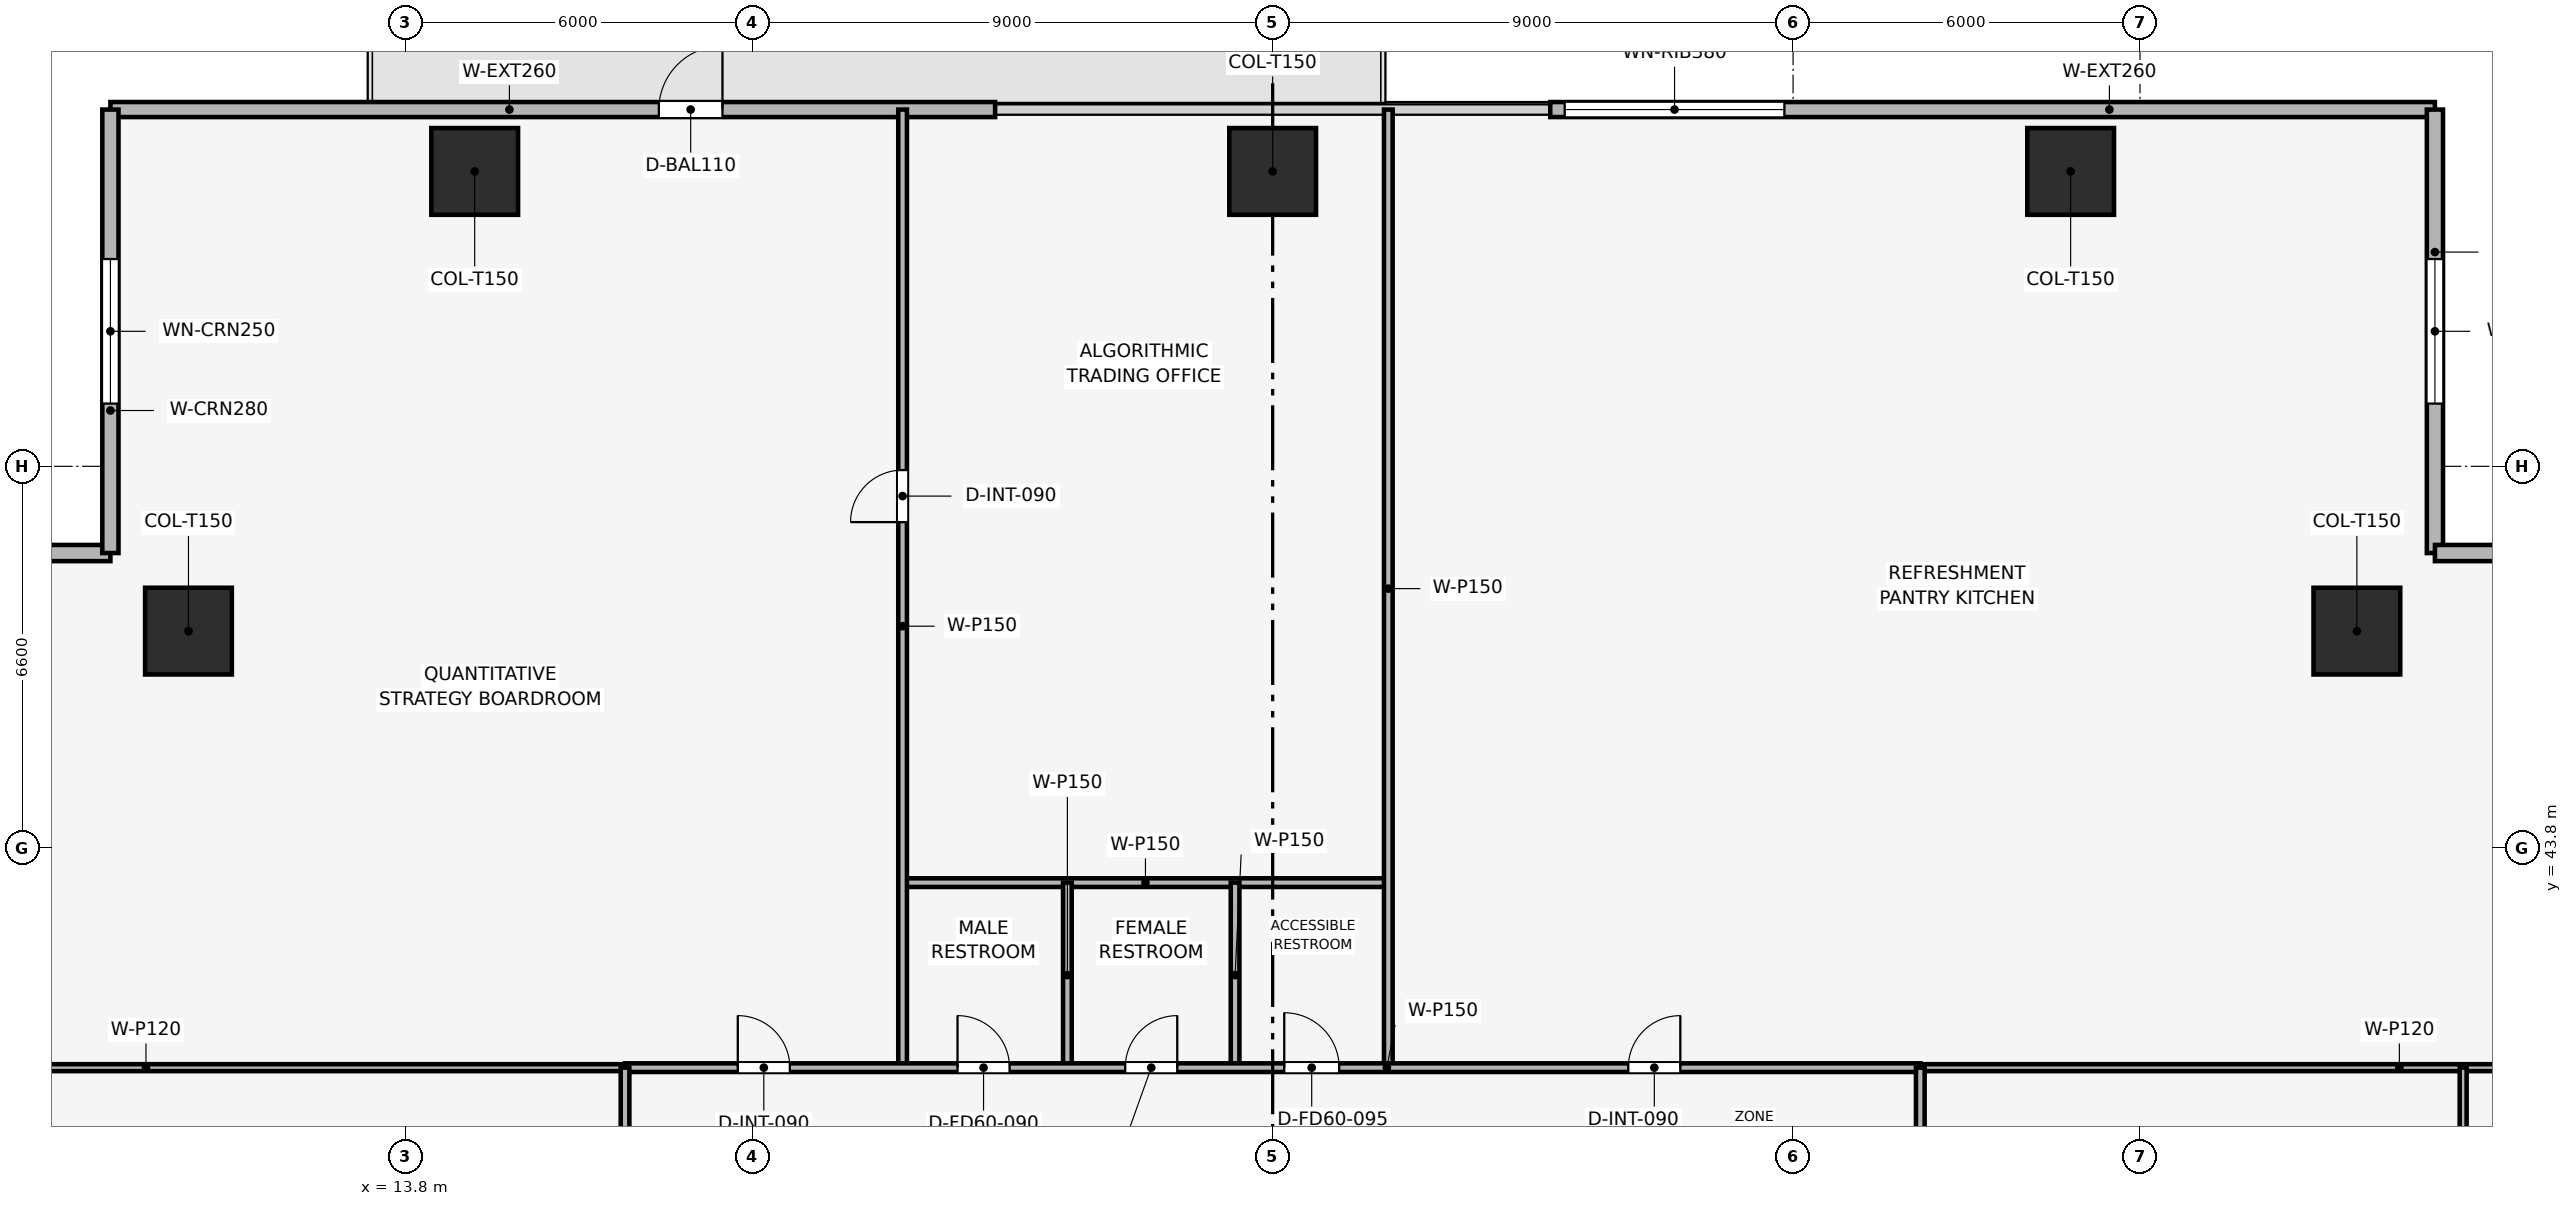
"""IFC4 building model, lengths in metres.
Left out: names, types, materials, properties, quantities, classifications, styles, units other than length and angle.
Written with IfcOpenShell. Run it as: python <this file> out.ifc"""

import sys

from ifc_helpers import new_model, si_unit, direction, frame, frame_2d, origin, origin_2d, place, context, subcontext, project, spatial, rectangle, extrude, element, fill, save


model = new_model("IFC4")
c1 = context("Model", 3, precision=1e-05, world=origin(), true_north=direction((0.0, 1.0)))
c2 = subcontext(c1, "Body", "Model", "MODEL_VIEW")
j1 = project(units=[si_unit("LENGTHUNIT", "METRE"), si_unit("PLANEANGLEUNIT", "RADIAN")], contexts=[c1])
p1 = place(None, origin())
s1 = spatial("IfcSite", under=j1, at=p1, CompositionType="ELEMENT")
p2 = place(p1, origin())
s2 = spatial("IfcBuilding", under=s1, at=p2, CompositionType="ELEMENT")
p3 = place(p2, frame((0.0, 0.0, 69.0)))
s3 = spatial("IfcBuildingStorey", under=s2, at=p3, CompositionType="ELEMENT", Elevation=69.0)
for number, where, z_axis, x_axis in (
    (1, (42.6, 55.5, 0.003), (0.0, 0.0, 1.0), (1.0, 0.0, 0.0)),
    (2, (28.8, 55.5, 0.003), (0.0, 0.0, 1.0), (1.0, 0.0, 0.0)),
    (3, (15.0, 55.5, 0.003), (0.0, 0.0, 1.0), (1.0, 0.0, 0.0)),
    (4, (47.55, 47.55, 0.003), (0.0, 0.0, 1.0), (1.0, 0.0, 0.0)),
    (5, (10.05, 47.55, 0.003), (0.0, 0.0, 1.0), (1.0, 0.0, 0.0)),
):
    element("IfcColumn", number, at=place(p3, frame(where, z_axis=z_axis, x_axis=x_axis)), inside=s3, PredefinedType="COLUMN", context=c2, shape_type="SweptSolid", body=[
        extrude(rectangle(XDim=1.5, YDim=1.5, at=origin_2d()), origin(), (0.0, 0.0, 1.0), 3.644),
    ])
p4 = place(p3, frame((8.7, 56.57, 0.0), z_axis=(0.0, 0.0, 1.0), x_axis=(1.0, 0.0, 0.0)))
e6 = element("IfcWall", 6, at=p4, inside=s3, PredefinedType="SOLIDWALL", context=c2, shape_type="SweptSolid", body=[
    extrude(rectangle(XDim=15.3, YDim=0.26, at=frame_2d((7.65, 0.0))), origin(), (0.0, 0.0, 1.0), 3.65),
])
p5 = place(p4, frame((9.485, 0.0, 0.0)))
e7 = element("IfcOpeningElement", 7, at=p5, cuts=e6, PredefinedType="OPENING", context=c2, shape_type="SweptSolid", body=[
    extrude(rectangle(XDim=1.1, YDim=2.2, at=frame_2d((0.55, 1.1))), frame((0.0, 0.14, 0.0), z_axis=(0.0, -1.0, 0.0), x_axis=(1.0, 0.0, 0.0)), (0.0, 0.0, 1.0), 0.28),
])
p6 = place(p3, frame((33.6, 56.57, 0.0), z_axis=(0.0, 0.0, 1.0), x_axis=(1.0, 0.0, 0.0)))
e8 = element("IfcWall", 8, at=p6, inside=s3, PredefinedType="SOLIDWALL", context=c2, shape_type="SweptSolid", body=[
    extrude(rectangle(XDim=15.3, YDim=0.26, at=frame_2d((7.65, 0.0))), origin(), (0.0, 0.0, 1.0), 3.65),
])
p7 = place(p6, frame((0.25, 0.0, 0.9)))
e9 = element("IfcOpeningElement", 9, at=p7, cuts=e8, PredefinedType="OPENING", context=c2, shape_type="SweptSolid", body=[
    extrude(rectangle(XDim=3.8, YDim=1.9, at=frame_2d((1.9, 0.95))), frame((0.0, 0.14, 0.0), z_axis=(0.0, -1.0, 0.0), x_axis=(1.0, 0.0, 0.0)), (0.0, 0.0, 1.0), 0.28),
])
p8 = place(p3, frame((1.03, 48.9, 0.0), z_axis=(0.0, 0.0, 1.0), x_axis=(1.0, 0.0, 0.0)))
e10 = element("IfcWall", 10, at=p8, inside=s3, PredefinedType="SOLIDWALL", context=c2, shape_type="SweptSolid", body=[
    extrude(rectangle(XDim=7.67, YDim=0.28, at=frame_2d((3.835, 0.0))), origin(), (0.0, 0.0, 1.0), 3.65),
])
p9 = place(p8, frame((2.585, 0.0, 0.9)))
e11 = element("IfcOpeningElement", 11, at=p9, cuts=e10, PredefinedType="OPENING", context=c2, shape_type="SweptSolid", body=[
    extrude(rectangle(XDim=2.5, YDim=1.9, at=frame_2d((1.25, 0.95))), frame((0.0, 0.15, 0.0), z_axis=(0.0, -1.0, 0.0), x_axis=(1.0, 0.0, 0.0)), (0.0, 0.0, 1.0), 0.3),
])
p10 = place(p3, frame((8.7, 48.9, 0.0), z_axis=(0.0, 0.0, 1.0), x_axis=(0.0, 1.0, 0.0)))
e12 = element("IfcWall", 12, at=p10, inside=s3, PredefinedType="SOLIDWALL", context=c2, shape_type="SweptSolid", body=[
    extrude(rectangle(XDim=7.67, YDim=0.28, at=frame_2d((3.835, 0.0))), origin(), (0.0, 0.0, 1.0), 3.65),
])
p11 = place(p10, frame((2.585, 0.0, 0.9)))
e13 = element("IfcOpeningElement", 13, at=p11, cuts=e12, PredefinedType="OPENING", context=c2, shape_type="SweptSolid", body=[
    extrude(rectangle(XDim=2.5, YDim=1.9, at=frame_2d((1.25, 0.95))), frame((0.0, 0.15, 0.0), z_axis=(0.0, -1.0, 0.0), x_axis=(1.0, 0.0, 0.0)), (0.0, 0.0, 1.0), 0.3),
])
p12 = place(p3, frame((48.9, 56.57, 0.0), z_axis=(0.0, 0.0, 1.0), x_axis=(0.0, -1.0, 0.0)))
e14 = element("IfcWall", 14, at=p12, inside=s3, PredefinedType="SOLIDWALL", context=c2, shape_type="SweptSolid", body=[
    extrude(rectangle(XDim=7.67, YDim=0.28, at=frame_2d((3.835, 0.0))), origin(), (0.0, 0.0, 1.0), 3.65),
])
p13 = place(p12, frame((2.585, 0.0, 0.9)))
e15 = element("IfcOpeningElement", 15, at=p13, cuts=e14, PredefinedType="OPENING", context=c2, shape_type="SweptSolid", body=[
    extrude(rectangle(XDim=2.5, YDim=1.9, at=frame_2d((1.25, 0.95))), frame((0.0, 0.15, 0.0), z_axis=(0.0, -1.0, 0.0), x_axis=(1.0, 0.0, 0.0)), (0.0, 0.0, 1.0), 0.3),
])
p14 = place(p3, frame((48.9, 48.9, 0.0), z_axis=(0.0, 0.0, 1.0), x_axis=(1.0, 0.0, 0.0)))
e16 = element("IfcWall", 16, at=p14, inside=s3, PredefinedType="SOLIDWALL", context=c2, shape_type="SweptSolid", body=[
    extrude(rectangle(XDim=7.67, YDim=0.28, at=frame_2d((3.835, 0.0))), origin(), (0.0, 0.0, 1.0), 3.65),
])
p15 = place(p14, frame((2.585, 0.0, 0.9)))
e17 = element("IfcOpeningElement", 17, at=p15, cuts=e16, PredefinedType="OPENING", context=c2, shape_type="SweptSolid", body=[
    extrude(rectangle(XDim=2.5, YDim=1.9, at=frame_2d((1.25, 0.95))), frame((0.0, 0.15, 0.0), z_axis=(0.0, -1.0, 0.0), x_axis=(1.0, 0.0, 0.0)), (0.0, 0.0, 1.0), 0.3),
])
p16 = place(p3, frame((22.4, 43.2, 0.0), z_axis=(0.0, 0.0, 1.0), x_axis=(1.0, 0.0, 0.0)))
e18 = element("IfcWall", 18, at=p16, inside=s3, PredefinedType="PARTITIONING", context=c2, shape_type="SweptSolid", body=[
    extrude(rectangle(XDim=8.4, YDim=0.15, at=frame_2d((4.2, 0.0))), origin(), (0.0, 0.0, 1.0), 3.085),
])
p17 = place(p3, frame((22.4, 40.0, 0.0), z_axis=(0.0, 0.0, 1.0), x_axis=(0.0, 1.0, 0.0)))
e19 = element("IfcWall", 19, at=p17, inside=s3, PredefinedType="PARTITIONING", context=c2, shape_type="SweptSolid", body=[
    extrude(rectangle(XDim=16.57, YDim=0.15, at=frame_2d((8.285, 0.0))), origin(), (0.0, 0.0, 1.0), 2.935),
])
p18 = place(p17, frame((9.435, 0.0, 0.0)))
e20 = element("IfcOpeningElement", 20, at=p18, cuts=e19, PredefinedType="OPENING", context=c2, shape_type="SweptSolid", body=[
    extrude(rectangle(XDim=0.9, YDim=2.1, at=frame_2d((0.45, 1.05))), frame((0.0, 0.085, 0.0), z_axis=(0.0, -1.0, 0.0), x_axis=(1.0, 0.0, 0.0)), (0.0, 0.0, 1.0), 0.17),
])
p19 = place(p3, frame((30.8, 40.0, 0.0), z_axis=(0.0, 0.0, 1.0), x_axis=(0.0, 1.0, 0.0)))
e21 = element("IfcWall", 21, at=p19, inside=s3, PredefinedType="PARTITIONING", context=c2, shape_type="SweptSolid", body=[
    extrude(rectangle(XDim=16.57, YDim=0.15, at=frame_2d((8.285, 0.0))), origin(), (0.0, 0.0, 1.0), 2.935),
])
for number, where, z_axis, x_axis in (
    (22, (25.25, 40.0, 0.0), (0.0, 0.0, 1.0), (0.0, 1.0, 0.0)),
    (23, (28.15, 40.0, 0.0), (0.0, 0.0, 1.0), (0.0, 1.0, 0.0)),
):
    element("IfcWall", number, at=place(p3, frame(where, z_axis=z_axis, x_axis=x_axis)), inside=s3, PredefinedType="PARTITIONING", context=c2, shape_type="SweptSolid", body=[
        extrude(rectangle(XDim=3.2, YDim=0.15, at=frame_2d((1.6, 0.0))), origin(), (0.0, 0.0, 1.0), 3.65),
    ])
for number, where, z_axis, x_axis in (
    (24, (1.03, 40.0, 0.0), (0.0, 0.0, 1.0), (1.0, 0.0, 0.0)),
    (25, (40.0, 40.0, 0.0), (0.0, 0.0, 1.0), (1.0, 0.0, 0.0)),
):
    element("IfcWall", number, at=place(p3, frame(where, z_axis=z_axis, x_axis=x_axis)), inside=s3, PredefinedType="PARTITIONING", context=c2, shape_type="SweptSolid", body=[
        extrude(rectangle(XDim=16.57, YDim=0.12, at=frame_2d((8.285, 0.0))), origin(), (0.0, 0.0, 1.0), 2.935),
    ])
p20 = place(p3, frame((49.388, 23.638, 0.0), z_axis=(0.0, 0.0, 1.0), x_axis=(0.0, 1.0, 0.0)))
e26 = element("IfcWall", 26, at=p20, inside=s3, PredefinedType="PARTITIONING", context=c2, shape_type="SweptSolid", body=[
    extrude(rectangle(XDim=16.362, YDim=0.12, at=frame_2d((8.181, 0.0))), origin(), (0.0, 0.0, 1.0), 3.085),
])
p21 = place(p20, frame((11.496, 0.0, 0.0)))
e27 = element("IfcOpeningElement", 27, at=p21, cuts=e26, PredefinedType="OPENING", context=c2, shape_type="SweptSolid", body=[
    extrude(rectangle(XDim=0.9, YDim=2.1, at=frame_2d((0.45, 1.05))), frame((0.0, 0.07, 0.0), z_axis=(0.0, -1.0, 0.0), x_axis=(1.0, 0.0, 0.0)), (0.0, 0.0, 1.0), 0.14),
])
p22 = place(p3, frame((17.6, 40.0, 0.0), z_axis=(0.0, 0.0, 1.0), x_axis=(1.0, 0.0, 0.0)))
e28 = element("IfcWall", 28, at=p22, inside=s3, PredefinedType="PARTITIONING", context=c2, shape_type="SweptSolid", body=[
    extrude(rectangle(XDim=22.4, YDim=0.15, at=frame_2d((11.2, 0.0))), origin(), (0.0, 0.0, 1.0), 3.085),
])
p23 = place(p22, frame((1.95, 0.0, 0.0)))
e29 = element("IfcOpeningElement", 29, at=p23, cuts=e28, PredefinedType="OPENING", context=c2, shape_type="SweptSolid", body=[
    extrude(rectangle(XDim=0.9, YDim=2.1, at=frame_2d((0.45, 1.05))), frame((0.0, 0.085, 0.0), z_axis=(0.0, -1.0, 0.0), x_axis=(1.0, 0.0, 0.0)), (0.0, 0.0, 1.0), 0.17),
])
p24 = place(p22, frame((5.75, 0.0, 0.0)))
e30 = element("IfcOpeningElement", 30, at=p24, cuts=e28, PredefinedType="OPENING", context=c2, shape_type="SweptSolid", body=[
    extrude(rectangle(XDim=0.9, YDim=2.1, at=frame_2d((0.45, 1.05))), frame((0.0, 0.085, 0.0), z_axis=(0.0, -1.0, 0.0), x_axis=(1.0, 0.0, 0.0)), (0.0, 0.0, 1.0), 0.17),
])
p25 = place(p22, frame((8.65, 0.0, 0.0)))
e31 = element("IfcOpeningElement", 31, at=p25, cuts=e28, PredefinedType="OPENING", context=c2, shape_type="SweptSolid", body=[
    extrude(rectangle(XDim=0.9, YDim=2.1, at=frame_2d((0.45, 1.05))), frame((0.0, 0.085, 0.0), z_axis=(0.0, -1.0, 0.0), x_axis=(1.0, 0.0, 0.0)), (0.0, 0.0, 1.0), 0.17),
])
p26 = place(p22, frame((11.4, 0.0, 0.0)))
e32 = element("IfcOpeningElement", 32, at=p26, cuts=e28, PredefinedType="OPENING", context=c2, shape_type="SweptSolid", body=[
    extrude(rectangle(XDim=0.95, YDim=2.1, at=frame_2d((0.475, 1.05))), frame((0.0, 0.085, 0.0), z_axis=(0.0, -1.0, 0.0), x_axis=(1.0, 0.0, 0.0)), (0.0, 0.0, 1.0), 0.17),
])
p27 = place(p22, frame((17.35, 0.0, 0.0)))
e33 = element("IfcOpeningElement", 33, at=p27, cuts=e28, PredefinedType="OPENING", context=c2, shape_type="SweptSolid", body=[
    extrude(rectangle(XDim=0.9, YDim=2.1, at=frame_2d((0.45, 1.05))), frame((0.0, 0.085, 0.0), z_axis=(0.0, -1.0, 0.0), x_axis=(1.0, 0.0, 0.0)), (0.0, 0.0, 1.0), 0.17),
])
p28 = place(p3, frame((17.6, 17.6, 0.0), z_axis=(0.0, 0.0, 1.0), x_axis=(0.0, 1.0, 0.0)))
e34 = element("IfcWall", 34, at=p28, inside=s3, PredefinedType="PARTITIONING", context=c2, shape_type="SweptSolid", body=[
    extrude(rectangle(XDim=22.4, YDim=0.15, at=frame_2d((11.2, 0.0))), origin(), (0.0, 0.0, 1.0), 3.085),
])
p29 = place(p28, frame((10.75, 0.0, 0.0)))
e35 = element("IfcOpeningElement", 35, at=p29, cuts=e34, PredefinedType="OPENING", context=c2, shape_type="SweptSolid", body=[
    extrude(rectangle(XDim=0.9, YDim=2.1, at=frame_2d((0.45, 1.05))), frame((0.0, 0.085, 0.0), z_axis=(0.0, -1.0, 0.0), x_axis=(1.0, 0.0, 0.0)), (0.0, 0.0, 1.0), 0.17),
])
p30 = place(p3, frame((40.0, 17.6, 0.0), z_axis=(0.0, 0.0, 1.0), x_axis=(0.0, 1.0, 0.0)))
e36 = element("IfcWall", 36, at=p30, inside=s3, PredefinedType="PARTITIONING", context=c2, shape_type="SweptSolid", body=[
    extrude(rectangle(XDim=22.4, YDim=0.15, at=frame_2d((11.2, 0.0))), origin(), (0.0, 0.0, 1.0), 3.085),
])
p31 = place(p30, frame((2.569, 0.0, 0.0)))
e37 = element("IfcOpeningElement", 37, at=p31, cuts=e36, PredefinedType="OPENING", context=c2, shape_type="SweptSolid", body=[
    extrude(rectangle(XDim=0.9, YDim=2.1, at=frame_2d((0.45, 1.05))), frame((0.0, 0.085, 0.0), z_axis=(0.0, -1.0, 0.0), x_axis=(1.0, 0.0, 0.0)), (0.0, 0.0, 1.0), 0.17),
])
p32 = place(p30, frame((13.769, 0.0, 0.0)))
e38 = element("IfcOpeningElement", 38, at=p32, cuts=e36, PredefinedType="OPENING", context=c2, shape_type="SweptSolid", body=[
    extrude(rectangle(XDim=0.9, YDim=2.1, at=frame_2d((0.45, 1.05))), frame((0.0, 0.085, 0.0), z_axis=(0.0, -1.0, 0.0), x_axis=(1.0, 0.0, 0.0)), (0.0, 0.0, 1.0), 0.17),
])
p33 = place(p5, origin())
e39 = element("IfcDoor", 39, at=p33, inside=s3, OperationType="SINGLE_SWING_RIGHT", PredefinedType="DOOR", context=c2, shape_type="SweptSolid", body=[
    extrude(rectangle(XDim=1.1, YDim=2.2, at=frame_2d((0.55, 1.1))), frame((0.0, 0.025, 0.0), z_axis=(0.0, -1.0, 0.0), x_axis=(1.0, 0.0, 0.0)), (0.0, 0.0, 1.0), 0.05),
])
fill(e7, e39)
p34 = place(p7, origin())
e40 = element("IfcWindow", 40, at=p34, inside=s3, PartitioningType="SINGLE_PANEL", PredefinedType="WINDOW", context=c2, shape_type="SweptSolid", body=[
    extrude(rectangle(XDim=3.8, YDim=1.9, at=frame_2d((1.9, 0.95))), frame((0.0, 0.03, 0.0), z_axis=(0.0, -1.0, 0.0), x_axis=(1.0, 0.0, 0.0)), (0.0, 0.0, 1.0), 0.06),
])
fill(e9, e40)
p35 = place(p11, origin())
e41 = element("IfcWindow", 41, at=p35, inside=s3, PartitioningType="SINGLE_PANEL", PredefinedType="WINDOW", context=c2, shape_type="SweptSolid", body=[
    extrude(rectangle(XDim=2.5, YDim=1.9, at=frame_2d((1.25, 0.95))), frame((0.0, 0.03, 0.0), z_axis=(0.0, -1.0, 0.0), x_axis=(1.0, 0.0, 0.0)), (0.0, 0.0, 1.0), 0.06),
])
fill(e13, e41)
p36 = place(p13, origin())
e42 = element("IfcWindow", 42, at=p36, inside=s3, PartitioningType="SINGLE_PANEL", PredefinedType="WINDOW", context=c2, shape_type="SweptSolid", body=[
    extrude(rectangle(XDim=2.5, YDim=1.9, at=frame_2d((1.25, 0.95))), frame((0.0, 0.03, 0.0), z_axis=(0.0, -1.0, 0.0), x_axis=(1.0, 0.0, 0.0)), (0.0, 0.0, 1.0), 0.06),
])
fill(e15, e42)
p37 = place(p18, origin())
e43 = element("IfcDoor", 43, at=p37, inside=s3, OperationType="SINGLE_SWING_LEFT", PredefinedType="DOOR", context=c2, shape_type="SweptSolid", body=[
    extrude(rectangle(XDim=0.9, YDim=2.1, at=frame_2d((0.45, 1.05))), frame((0.0, 0.025, 0.0), z_axis=(0.0, -1.0, 0.0), x_axis=(1.0, 0.0, 0.0)), (0.0, 0.0, 1.0), 0.05),
])
fill(e20, e43)
p38 = place(p23, origin())
e44 = element("IfcDoor", 44, at=p38, inside=s3, OperationType="SINGLE_SWING_LEFT", PredefinedType="DOOR", context=c2, shape_type="SweptSolid", body=[
    extrude(rectangle(XDim=0.9, YDim=2.1, at=frame_2d((0.45, 1.05))), frame((0.0, 0.025, 0.0), z_axis=(0.0, -1.0, 0.0), x_axis=(1.0, 0.0, 0.0)), (0.0, 0.0, 1.0), 0.05),
])
fill(e29, e44)
p39 = place(p24, origin())
e45 = element("IfcDoor", 45, at=p39, inside=s3, OperationType="SINGLE_SWING_LEFT", PredefinedType="DOOR", context=c2, shape_type="SweptSolid", body=[
    extrude(rectangle(XDim=0.9, YDim=2.1, at=frame_2d((0.45, 1.05))), frame((0.0, 0.025, 0.0), z_axis=(0.0, -1.0, 0.0), x_axis=(1.0, 0.0, 0.0)), (0.0, 0.0, 1.0), 0.05),
])
fill(e30, e45)
p40 = place(p25, origin())
e46 = element("IfcDoor", 46, at=p40, inside=s3, OperationType="SINGLE_SWING_RIGHT", PredefinedType="DOOR", context=c2, shape_type="SweptSolid", body=[
    extrude(rectangle(XDim=0.9, YDim=2.1, at=frame_2d((0.45, 1.05))), frame((0.0, 0.025, 0.0), z_axis=(0.0, -1.0, 0.0), x_axis=(1.0, 0.0, 0.0)), (0.0, 0.0, 1.0), 0.05),
])
fill(e31, e46)
p41 = place(p26, origin())
e47 = element("IfcDoor", 47, at=p41, inside=s3, OperationType="SINGLE_SWING_LEFT", PredefinedType="DOOR", context=c2, shape_type="SweptSolid", body=[
    extrude(rectangle(XDim=0.95, YDim=2.1, at=frame_2d((0.475, 1.05))), frame((0.0, 0.025, 0.0), z_axis=(0.0, -1.0, 0.0), x_axis=(1.0, 0.0, 0.0)), (0.0, 0.0, 1.0), 0.05),
])
fill(e32, e47)
p42 = place(p27, origin())
e48 = element("IfcDoor", 48, at=p42, inside=s3, OperationType="SINGLE_SWING_RIGHT", PredefinedType="DOOR", context=c2, shape_type="SweptSolid", body=[
    extrude(rectangle(XDim=0.9, YDim=2.1, at=frame_2d((0.45, 1.05))), frame((0.0, 0.025, 0.0), z_axis=(0.0, -1.0, 0.0), x_axis=(1.0, 0.0, 0.0)), (0.0, 0.0, 1.0), 0.05),
])
fill(e33, e48)
save(model, sys.argv[1])
